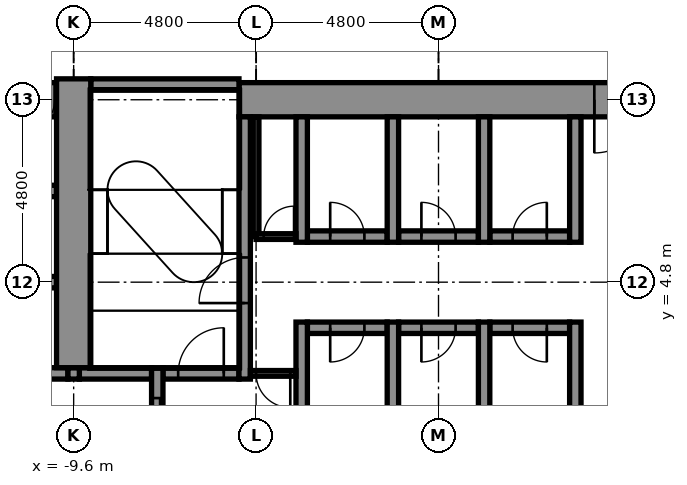
"""IFC4 building model, lengths in metres.
Left out: names, types, materials, properties, quantities, classifications, styles, units other than length and angle.
Written with IfcOpenShell. Run it as: python <this file> out.ifc"""

import sys

from ifc_helpers import new_model, si_unit, direction, frame, frame_2d, origin, place, context, subcontext, project, spatial, rectangle, extrude, element, fill, save


model = new_model("IFC4")
c1 = context("Model", 3, precision=1e-05, world=origin(), true_north=direction((0.0, 1.0)))
c2 = subcontext(c1, "Body", "Model", "MODEL_VIEW")
j1 = project(units=[si_unit("LENGTHUNIT", "METRE"), si_unit("PLANEANGLEUNIT", "RADIAN")], contexts=[c1])
p1 = place(None, origin())
s1 = spatial("IfcSite", under=j1, at=p1, CompositionType="ELEMENT")
p2 = place(p1, origin())
s2 = spatial("IfcBuilding", under=s1, at=p2, CompositionType="ELEMENT")
p3 = place(p2, frame((0.0, 0.0, 77.9)))
s3 = spatial("IfcBuildingStorey", under=s2, at=p3, CompositionType="ELEMENT", Elevation=77.9)
p4 = place(p3, frame((-10.85, 2.4, -0.2), z_axis=(0.0, 0.0, 1.0), x_axis=(1.0, 0.0, 0.0)))
e1 = element("IfcWall", 1, at=p4, inside=s3, PredefinedType="STANDARD", context=c2, shape_type="SweptSolid", body=[
    extrude(rectangle(XDim=1.1, YDim=0.3, at=frame_2d((0.55, 0.0))), origin(), (0.0, 0.0, 1.0), 4.5),
])
p5 = place(p3, frame((-9.45, 2.4, -0.2), z_axis=(0.0, 0.0, 1.0), x_axis=(1.0, 0.0, 0.0)))
e2 = element("IfcWall", 2, at=p5, inside=s3, PredefinedType="STANDARD", context=c2, shape_type="SweptSolid", body=[
    extrude(rectangle(XDim=1.9, YDim=0.3, at=frame_2d((0.95, 0.0))), origin(), (0.0, 0.0, 1.0), 4.5),
])
p6 = place(p3, frame((-7.25, 2.4, -0.2), z_axis=(0.0, 0.0, 1.0), x_axis=(1.0, 0.0, 0.0)))
e3 = element("IfcWall", 3, at=p6, inside=s3, PredefinedType="STANDARD", context=c2, shape_type="SweptSolid", body=[
    extrude(rectangle(XDim=2.0, YDim=0.3, at=frame_2d((1.0, 0.0))), origin(), (0.0, 0.0, 1.0), 4.5),
])
p7 = place(p6, frame((0.4, 0.0, 0.2)))
e4 = element("IfcOpeningElement", 4, at=p7, cuts=e3, PredefinedType="OPENING", context=c2, shape_type="SweptSolid", body=[
    extrude(rectangle(XDim=1.2, YDim=2.1, at=frame_2d((0.6, 1.05))), frame((0.0, 0.16, 0.0), z_axis=(0.0, -1.0, 0.0), x_axis=(1.0, 0.0, 0.0)), (0.0, 0.0, 1.0), 0.32),
])
p8 = place(p3, frame((-3.45, 3.6, -0.2), z_axis=(0.0, 0.0, 1.0), x_axis=(1.0, 0.0, 0.0)))
e5 = element("IfcWall", 5, at=p8, inside=s3, PredefinedType="STANDARD", context=c2, shape_type="SweptSolid", body=[
    extrude(rectangle(XDim=2.1, YDim=0.3, at=frame_2d((1.05, 0.0))), origin(), (0.0, 0.0, 1.0), 4.5),
])
p9 = place(p8, frame((0.6, 0.0, 0.2)))
e6 = element("IfcOpeningElement", 6, at=p9, cuts=e5, PredefinedType="OPENING", context=c2, shape_type="SweptSolid", body=[
    extrude(rectangle(XDim=0.9, YDim=2.1, at=frame_2d((0.45, 1.05))), frame((0.0, 0.16, 0.0), z_axis=(0.0, -1.0, 0.0), x_axis=(1.0, 0.0, 0.0)), (0.0, 0.0, 1.0), 0.32),
])
p10 = place(p3, frame((-1.05, 3.6, -0.2), z_axis=(0.0, 0.0, 1.0), x_axis=(1.0, 0.0, 0.0)))
e7 = element("IfcWall", 7, at=p10, inside=s3, PredefinedType="STANDARD", context=c2, shape_type="SweptSolid", body=[
    extrude(rectangle(XDim=2.1, YDim=0.3, at=frame_2d((1.05, 0.0))), origin(), (0.0, 0.0, 1.0), 4.5),
])
p11 = place(p10, frame((0.6, 0.0, 0.2)))
e8 = element("IfcOpeningElement", 8, at=p11, cuts=e7, PredefinedType="OPENING", context=c2, shape_type="SweptSolid", body=[
    extrude(rectangle(XDim=0.9, YDim=2.1, at=frame_2d((0.45, 1.05))), frame((0.0, 0.16, 0.0), z_axis=(0.0, -1.0, 0.0), x_axis=(1.0, 0.0, 0.0)), (0.0, 0.0, 1.0), 0.32),
])
p12 = place(p3, frame((1.35, 3.6, -0.2), z_axis=(0.0, 0.0, 1.0), x_axis=(1.0, 0.0, 0.0)))
e9 = element("IfcWall", 9, at=p12, inside=s3, PredefinedType="STANDARD", context=c2, shape_type="SweptSolid", body=[
    extrude(rectangle(XDim=2.1, YDim=0.3, at=frame_2d((1.05, 0.0))), origin(), (0.0, 0.0, 1.0), 4.5),
])
p13 = place(p12, frame((0.6, 0.0, 0.2)))
e10 = element("IfcOpeningElement", 10, at=p13, cuts=e9, PredefinedType="OPENING", context=c2, shape_type="SweptSolid", body=[
    extrude(rectangle(XDim=0.9, YDim=2.1, at=frame_2d((0.45, 1.05))), frame((0.0, 0.16, 0.0), z_axis=(0.0, -1.0, 0.0), x_axis=(1.0, 0.0, 0.0)), (0.0, 0.0, 1.0), 0.32),
])
p14 = place(p3, frame((-13.95, 4.8, -0.2), z_axis=(0.0, 0.0, 1.0), x_axis=(1.0, 0.0, 0.0)))
e11 = element("IfcWall", 11, at=p14, inside=s3, PredefinedType="STANDARD", context=c2, shape_type="SweptSolid", body=[
    extrude(rectangle(XDim=3.9, YDim=0.3, at=frame_2d((1.95, 0.0))), origin(), (0.0, 0.0, 1.0), 4.5),
])
p15 = place(p3, frame((-3.45, 6.0, -0.2), z_axis=(0.0, 0.0, 1.0), x_axis=(1.0, 0.0, 0.0)))
e12 = element("IfcWall", 12, at=p15, inside=s3, PredefinedType="STANDARD", context=c2, shape_type="SweptSolid", body=[
    extrude(rectangle(XDim=2.1, YDim=0.3, at=frame_2d((1.05, 0.0))), origin(), (0.0, 0.0, 1.0), 4.5),
])
p16 = place(p15, frame((0.6, 0.0, 0.2)))
e13 = element("IfcOpeningElement", 13, at=p16, cuts=e12, PredefinedType="OPENING", context=c2, shape_type="SweptSolid", body=[
    extrude(rectangle(XDim=0.9, YDim=2.1, at=frame_2d((0.45, 1.05))), frame((0.0, 0.16, 0.0), z_axis=(0.0, -1.0, 0.0), x_axis=(1.0, 0.0, 0.0)), (0.0, 0.0, 1.0), 0.32),
])
p17 = place(p3, frame((-1.05, 6.0, -0.2), z_axis=(0.0, 0.0, 1.0), x_axis=(1.0, 0.0, 0.0)))
e14 = element("IfcWall", 14, at=p17, inside=s3, PredefinedType="STANDARD", context=c2, shape_type="SweptSolid", body=[
    extrude(rectangle(XDim=2.1, YDim=0.3, at=frame_2d((1.05, 0.0))), origin(), (0.0, 0.0, 1.0), 4.5),
])
p18 = place(p17, frame((0.6, 0.0, 0.2)))
e15 = element("IfcOpeningElement", 15, at=p18, cuts=e14, PredefinedType="OPENING", context=c2, shape_type="SweptSolid", body=[
    extrude(rectangle(XDim=0.9, YDim=2.1, at=frame_2d((0.45, 1.05))), frame((0.0, 0.16, 0.0), z_axis=(0.0, -1.0, 0.0), x_axis=(1.0, 0.0, 0.0)), (0.0, 0.0, 1.0), 0.32),
])
p19 = place(p3, frame((1.35, 6.0, -0.2), z_axis=(0.0, 0.0, 1.0), x_axis=(1.0, 0.0, 0.0)))
e16 = element("IfcWall", 16, at=p19, inside=s3, PredefinedType="STANDARD", context=c2, shape_type="SweptSolid", body=[
    extrude(rectangle(XDim=2.1, YDim=0.3, at=frame_2d((1.05, 0.0))), origin(), (0.0, 0.0, 1.0), 4.5),
])
p20 = place(p19, frame((0.6, 0.0, 0.2)))
e17 = element("IfcOpeningElement", 17, at=p20, cuts=e16, PredefinedType="OPENING", context=c2, shape_type="SweptSolid", body=[
    extrude(rectangle(XDim=0.9, YDim=2.1, at=frame_2d((0.45, 1.05))), frame((0.0, 0.16, 0.0), z_axis=(0.0, -1.0, 0.0), x_axis=(1.0, 0.0, 0.0)), (0.0, 0.0, 1.0), 0.32),
])
p21 = place(p3, frame((-13.95, 7.2, -0.2), z_axis=(0.0, 0.0, 1.0), x_axis=(1.0, 0.0, 0.0)))
e18 = element("IfcWall", 18, at=p21, inside=s3, PredefinedType="STANDARD", context=c2, shape_type="SweptSolid", body=[
    extrude(rectangle(XDim=3.9, YDim=0.3, at=frame_2d((1.95, 0.0))), origin(), (0.0, 0.0, 1.0), 4.5),
])
p22 = place(p3, frame((-13.95, 9.6, -0.2), z_axis=(0.0, 0.0, 1.0), x_axis=(1.0, 0.0, 0.0)))
e19 = element("IfcWall", 19, at=p22, inside=s3, PredefinedType="SHEAR", context=c2, shape_type="SweptSolid", body=[
    extrude(rectangle(XDim=3.9, YDim=0.9, at=frame_2d((1.95, 0.0))), origin(), (0.0, 0.0, 1.0), 4.5),
])
p23 = place(p22, frame((0.7, 0.0, 0.2)))
e20 = element("IfcOpeningElement", 20, at=p23, cuts=e19, PredefinedType="OPENING", context=c2, shape_type="SweptSolid", body=[
    extrude(rectangle(XDim=0.9, YDim=2.1, at=frame_2d((0.45, 1.05))), frame((0.0, 0.46, 0.0), z_axis=(0.0, -1.0, 0.0), x_axis=(1.0, 0.0, 0.0)), (0.0, 0.0, 1.0), 0.92),
])
p24 = place(p22, frame((2.95, 0.0, 0.2)))
e21 = element("IfcOpeningElement", 21, at=p24, cuts=e19, PredefinedType="OPENING", context=c2, shape_type="SweptSolid", body=[
    extrude(rectangle(XDim=0.9, YDim=2.1, at=frame_2d((0.45, 1.05))), frame((0.0, 0.46, 0.0), z_axis=(0.0, -1.0, 0.0), x_axis=(1.0, 0.0, 0.0)), (0.0, 0.0, 1.0), 0.92),
])
p25 = place(p3, frame((-5.25, 9.6, -0.2), z_axis=(0.0, 0.0, 1.0), x_axis=(1.0, 0.0, 0.0)))
e22 = element("IfcWall", 22, at=p25, inside=s3, PredefinedType="SHEAR", context=c2, shape_type="SweptSolid", body=[
    extrude(rectangle(XDim=14.4, YDim=0.9, at=frame_2d((7.2, 0.0))), origin(), (0.0, 0.0, 1.0), 4.5),
])
p26 = place(p25, frame((9.35, 0.0, 0.2)))
e23 = element("IfcOpeningElement", 23, at=p26, cuts=e22, PredefinedType="OPENING", context=c2, shape_type="SweptSolid", body=[
    extrude(rectangle(XDim=1.4, YDim=2.1, at=frame_2d((0.7, 1.05))), frame((0.0, 0.46, 0.0), z_axis=(0.0, -1.0, 0.0), x_axis=(1.0, 0.0, 0.0)), (0.0, 0.0, 1.0), 0.92),
])
p27 = place(p3, frame((-9.15, 10.0, -0.2), z_axis=(0.0, 0.0, 1.0), x_axis=(1.0, 0.0, 0.0)))
e24 = element("IfcWall", 24, at=p27, inside=s3, PredefinedType="STANDARD", context=c2, shape_type="SweptSolid", body=[
    extrude(rectangle(XDim=3.9, YDim=0.3, at=frame_2d((1.95, 0.0))), origin(), (0.0, 0.0, 1.0), 4.5),
])
p28 = place(p3, frame((-9.6, 2.25, -0.2), z_axis=(0.0, 0.0, 1.0), x_axis=(0.0, 1.0, 0.0)))
e25 = element("IfcWall", 25, at=p28, inside=s3, PredefinedType="STANDARD", context=c2, shape_type="SweptSolid", body=[
    extrude(rectangle(XDim=0.3, YDim=0.3, at=frame_2d((0.15, 0.0))), origin(), (0.0, 0.0, 1.0), 4.5),
])
p29 = place(p3, frame((-9.6, 2.55, -0.2), z_axis=(0.0, 0.0, 1.0), x_axis=(0.0, 1.0, 0.0)))
e26 = element("IfcWall", 26, at=p29, inside=s3, PredefinedType="SHEAR", context=c2, shape_type="SweptSolid", body=[
    extrude(rectangle(XDim=7.6, YDim=0.9, at=frame_2d((3.8, 0.0))), origin(), (0.0, 0.0, 1.0), 4.5),
])
p30 = place(p3, frame((-7.4, -2.55, -0.2), z_axis=(0.0, 0.0, 1.0), x_axis=(0.0, 1.0, 0.0)))
e27 = element("IfcWall", 27, at=p30, inside=s3, PredefinedType="STANDARD", context=c2, shape_type="SweptSolid", body=[
    extrude(rectangle(XDim=5.1, YDim=0.3, at=frame_2d((2.55, 0.0))), origin(), (0.0, 0.0, 1.0), 4.5),
])
p31 = place(p30, frame((0.8, 0.0, 0.2)))
e28 = element("IfcOpeningElement", 28, at=p31, cuts=e27, PredefinedType="OPENING", context=c2, shape_type="SweptSolid", body=[
    extrude(rectangle(XDim=1.1, YDim=2.1, at=frame_2d((0.55, 1.05))), frame((0.0, 0.16, 0.0), z_axis=(0.0, -1.0, 0.0), x_axis=(1.0, 0.0, 0.0)), (0.0, 0.0, 1.0), 0.32),
])
p32 = place(p30, frame((3.2, 0.0, 0.2)))
e29 = element("IfcOpeningElement", 29, at=p32, cuts=e27, PredefinedType="OPENING", context=c2, shape_type="SweptSolid", body=[
    extrude(rectangle(XDim=1.1, YDim=2.1, at=frame_2d((0.55, 1.05))), frame((0.0, 0.16, 0.0), z_axis=(0.0, -1.0, 0.0), x_axis=(1.0, 0.0, 0.0)), (0.0, 0.0, 1.0), 0.32),
])
p33 = place(p3, frame((-5.1, 2.25, -0.2), z_axis=(0.0, 0.0, 1.0), x_axis=(0.0, 1.0, 0.0)))
e30 = element("IfcWall", 30, at=p33, inside=s3, PredefinedType="STANDARD", context=c2, shape_type="SweptSolid", body=[
    extrude(rectangle(XDim=6.9, YDim=0.3, at=frame_2d((3.45, 0.0))), origin(), (0.0, 0.0, 1.0), 4.5),
])
p34 = place(p33, frame((2.0, 0.0, 0.2)))
e31 = element("IfcOpeningElement", 31, at=p34, cuts=e30, PredefinedType="OPENING", context=c2, shape_type="SweptSolid", body=[
    extrude(rectangle(XDim=1.2, YDim=2.1, at=frame_2d((0.6, 1.05))), frame((0.0, 0.16, 0.0), z_axis=(0.0, -1.0, 0.0), x_axis=(1.0, 0.0, 0.0)), (0.0, 0.0, 1.0), 0.32),
])
p35 = place(p3, frame((-3.6, -3.75, -0.2), z_axis=(0.0, 0.0, 1.0), x_axis=(0.0, 1.0, 0.0)))
e32 = element("IfcWall", 32, at=p35, inside=s3, PredefinedType="STANDARD", context=c2, shape_type="SweptSolid", body=[
    extrude(rectangle(XDim=7.5, YDim=0.3, at=frame_2d((3.75, 0.0))), origin(), (0.0, 0.0, 1.0), 4.5),
])
p36 = place(p3, frame((-3.6, 5.85, -0.2), z_axis=(0.0, 0.0, 1.0), x_axis=(0.0, 1.0, 0.0)))
e33 = element("IfcWall", 33, at=p36, inside=s3, PredefinedType="STANDARD", context=c2, shape_type="SweptSolid", body=[
    extrude(rectangle(XDim=3.3, YDim=0.3, at=frame_2d((1.65, 0.0))), origin(), (0.0, 0.0, 1.0), 4.5),
])
p37 = place(p3, frame((-1.2, -3.75, -0.2), z_axis=(0.0, 0.0, 1.0), x_axis=(0.0, 1.0, 0.0)))
e34 = element("IfcWall", 34, at=p37, inside=s3, PredefinedType="STANDARD", context=c2, shape_type="SweptSolid", body=[
    extrude(rectangle(XDim=7.5, YDim=0.3, at=frame_2d((3.75, 0.0))), origin(), (0.0, 0.0, 1.0), 4.5),
])
p38 = place(p3, frame((-1.2, 5.85, -0.2), z_axis=(0.0, 0.0, 1.0), x_axis=(0.0, 1.0, 0.0)))
e35 = element("IfcWall", 35, at=p38, inside=s3, PredefinedType="STANDARD", context=c2, shape_type="SweptSolid", body=[
    extrude(rectangle(XDim=3.3, YDim=0.3, at=frame_2d((1.65, 0.0))), origin(), (0.0, 0.0, 1.0), 4.5),
])
p39 = place(p3, frame((1.2, -3.75, -0.2), z_axis=(0.0, 0.0, 1.0), x_axis=(0.0, 1.0, 0.0)))
e36 = element("IfcWall", 36, at=p39, inside=s3, PredefinedType="STANDARD", context=c2, shape_type="SweptSolid", body=[
    extrude(rectangle(XDim=7.5, YDim=0.3, at=frame_2d((3.75, 0.0))), origin(), (0.0, 0.0, 1.0), 4.5),
])
p40 = place(p3, frame((1.2, 5.85, -0.2), z_axis=(0.0, 0.0, 1.0), x_axis=(0.0, 1.0, 0.0)))
e37 = element("IfcWall", 37, at=p40, inside=s3, PredefinedType="STANDARD", context=c2, shape_type="SweptSolid", body=[
    extrude(rectangle(XDim=3.3, YDim=0.3, at=frame_2d((1.65, 0.0))), origin(), (0.0, 0.0, 1.0), 4.5),
])
p41 = place(p3, frame((3.6, -3.75, -0.2), z_axis=(0.0, 0.0, 1.0), x_axis=(0.0, 1.0, 0.0)))
e38 = element("IfcWall", 38, at=p41, inside=s3, PredefinedType="STANDARD", context=c2, shape_type="SweptSolid", body=[
    extrude(rectangle(XDim=7.5, YDim=0.3, at=frame_2d((3.75, 0.0))), origin(), (0.0, 0.0, 1.0), 4.5),
])
p42 = place(p3, frame((3.6, 5.85, -0.2), z_axis=(0.0, 0.0, 1.0), x_axis=(0.0, 1.0, 0.0)))
e39 = element("IfcWall", 39, at=p42, inside=s3, PredefinedType="STANDARD", context=c2, shape_type="SweptSolid", body=[
    extrude(rectangle(XDim=3.3, YDim=0.3, at=frame_2d((1.65, 0.0))), origin(), (0.0, 0.0, 1.0), 4.5),
])
p43 = place(p3, frame((-4.8, 6.0, 0.0), z_axis=(0.0, 0.0, 1.0), x_axis=(0.0, 1.0, 0.0)))
e40 = element("IfcWall", 40, at=p43, inside=s3, PredefinedType="PARTITIONING", context=c2, shape_type="SweptSolid", body=[
    extrude(rectangle(XDim=3.15, YDim=0.15, at=frame_2d((1.575, 0.0))), origin(), (0.0, 0.0, 1.0), 4.3),
])
p44 = place(p3, frame((-4.8, 6.0, 0.0), z_axis=(0.0, 0.0, 1.0), x_axis=(1.0, 0.0, 0.0)))
e41 = element("IfcWall", 41, at=p44, inside=s3, PredefinedType="PARTITIONING", context=c2, shape_type="SweptSolid", body=[
    extrude(rectangle(XDim=1.05, YDim=0.15, at=frame_2d((0.525, 0.0))), origin(), (0.0, 0.0, 1.0), 4.3),
])
p45 = place(p44, frame((0.2, 0.0, 0.0)))
e42 = element("IfcOpeningElement", 42, at=p45, cuts=e41, PredefinedType="OPENING", context=c2, shape_type="SweptSolid", body=[
    extrude(rectangle(XDim=0.8, YDim=2.1, at=frame_2d((0.4, 1.05))), frame((0.0, 0.085, 0.0), z_axis=(0.0, -1.0, 0.0), x_axis=(1.0, 0.0, 0.0)), (0.0, 0.0, 1.0), 0.17),
])
p46 = place(p3, frame((-4.95, 2.4, 0.0), z_axis=(0.0, 0.0, 1.0), x_axis=(1.0, 0.0, 0.0)))
e43 = element("IfcWall", 43, at=p46, inside=s3, PredefinedType="PARTITIONING", context=c2, shape_type="SweptSolid", body=[
    extrude(rectangle(XDim=1.2, YDim=0.15, at=frame_2d((0.6, 0.0))), origin(), (0.0, 0.0, 1.0), 4.3),
])
p47 = place(p46, frame((0.15, 0.0, 0.0)))
e44 = element("IfcOpeningElement", 44, at=p47, cuts=e43, PredefinedType="OPENING", context=c2, shape_type="SweptSolid", body=[
    extrude(rectangle(XDim=0.9, YDim=2.1, at=frame_2d((0.45, 1.05))), frame((0.0, 0.085, 0.0), z_axis=(0.0, -1.0, 0.0), x_axis=(1.0, 0.0, 0.0)), (0.0, 0.0, 1.0), 0.17),
])
p48 = place(p45, origin())
e45 = element("IfcDoor", 45, at=p48, inside=s3, OperationType="SINGLE_SWING_RIGHT", PredefinedType="DOOR", context=c2, shape_type="SweptSolid", body=[
    extrude(rectangle(XDim=0.8, YDim=2.1, at=frame_2d((0.4, 1.05))), frame((0.0, 0.025, 0.0), z_axis=(0.0, -1.0, 0.0), x_axis=(1.0, 0.0, 0.0)), (0.0, 0.0, 1.0), 0.05),
])
fill(e42, e45)
p49 = place(p32, origin())
e46 = element("IfcDoor", 46, at=p49, inside=s3, OperationType="DOUBLE_DOOR_SLIDING", PredefinedType="DOOR", context=c2, shape_type="SweptSolid", body=[
    extrude(rectangle(XDim=1.1, YDim=2.1, at=frame_2d((0.55, 1.05))), frame((0.0, 0.025, 0.0), z_axis=(0.0, -1.0, 0.0), x_axis=(1.0, 0.0, 0.0)), (0.0, 0.0, 1.0), 0.05),
])
fill(e29, e46)
p50 = place(p34, origin())
e47 = element("IfcDoor", 47, at=p50, inside=s3, OperationType="SINGLE_SWING_LEFT", PredefinedType="DOOR", context=c2, shape_type="SweptSolid", body=[
    extrude(rectangle(XDim=1.2, YDim=2.1, at=frame_2d((0.6, 1.05))), frame((0.0, 0.025, 0.0), z_axis=(0.0, -1.0, 0.0), x_axis=(1.0, 0.0, 0.0)), (0.0, 0.0, 1.0), 0.05),
])
fill(e31, e47)
p51 = place(p16, origin())
e48 = element("IfcDoor", 48, at=p51, inside=s3, OperationType="SINGLE_SWING_LEFT", PredefinedType="DOOR", context=c2, shape_type="SweptSolid", body=[
    extrude(rectangle(XDim=0.9, YDim=2.1, at=frame_2d((0.45, 1.05))), frame((0.0, 0.025, 0.0), z_axis=(0.0, -1.0, 0.0), x_axis=(1.0, 0.0, 0.0)), (0.0, 0.0, 1.0), 0.05),
])
fill(e13, e48)
p52 = place(p18, origin())
e49 = element("IfcDoor", 49, at=p52, inside=s3, OperationType="SINGLE_SWING_LEFT", PredefinedType="DOOR", context=c2, shape_type="SweptSolid", body=[
    extrude(rectangle(XDim=0.9, YDim=2.1, at=frame_2d((0.45, 1.05))), frame((0.0, 0.025, 0.0), z_axis=(0.0, -1.0, 0.0), x_axis=(1.0, 0.0, 0.0)), (0.0, 0.0, 1.0), 0.05),
])
fill(e15, e49)
p53 = place(p20, origin())
e50 = element("IfcDoor", 50, at=p53, inside=s3, OperationType="SINGLE_SWING_RIGHT", PredefinedType="DOOR", context=c2, shape_type="SweptSolid", body=[
    extrude(rectangle(XDim=0.9, YDim=2.1, at=frame_2d((0.45, 1.05))), frame((0.0, 0.025, 0.0), z_axis=(0.0, -1.0, 0.0), x_axis=(1.0, 0.0, 0.0)), (0.0, 0.0, 1.0), 0.05),
])
fill(e17, e50)
p54 = place(p9, frame((0.9, 0.0, 0.0), z_axis=(0.0, 0.0, 1.0), x_axis=(-1.0, 0.0, 0.0)))
e51 = element("IfcDoor", 51, at=p54, inside=s3, OperationType="SINGLE_SWING_LEFT", PredefinedType="DOOR", context=c2, shape_type="SweptSolid", body=[
    extrude(rectangle(XDim=0.9, YDim=2.1, at=frame_2d((0.45, 1.05))), frame((0.0, 0.025, 0.0), z_axis=(0.0, -1.0, 0.0), x_axis=(1.0, 0.0, 0.0)), (0.0, 0.0, 1.0), 0.05),
])
fill(e6, e51)
p55 = place(p11, frame((0.9, 0.0, 0.0), z_axis=(0.0, 0.0, 1.0), x_axis=(-1.0, 0.0, 0.0)))
e52 = element("IfcDoor", 52, at=p55, inside=s3, OperationType="SINGLE_SWING_LEFT", PredefinedType="DOOR", context=c2, shape_type="SweptSolid", body=[
    extrude(rectangle(XDim=0.9, YDim=2.1, at=frame_2d((0.45, 1.05))), frame((0.0, 0.025, 0.0), z_axis=(0.0, -1.0, 0.0), x_axis=(1.0, 0.0, 0.0)), (0.0, 0.0, 1.0), 0.05),
])
fill(e8, e52)
p56 = place(p13, frame((0.9, 0.0, 0.0), z_axis=(0.0, 0.0, 1.0), x_axis=(-1.0, 0.0, 0.0)))
e53 = element("IfcDoor", 53, at=p56, inside=s3, OperationType="SINGLE_SWING_RIGHT", PredefinedType="DOOR", context=c2, shape_type="SweptSolid", body=[
    extrude(rectangle(XDim=0.9, YDim=2.1, at=frame_2d((0.45, 1.05))), frame((0.0, 0.025, 0.0), z_axis=(0.0, -1.0, 0.0), x_axis=(1.0, 0.0, 0.0)), (0.0, 0.0, 1.0), 0.05),
])
fill(e10, e53)
p57 = place(p24, frame((0.9, 0.0, 0.0), z_axis=(0.0, 0.0, 1.0), x_axis=(-1.0, 0.0, 0.0)))
e54 = element("IfcDoor", 54, at=p57, inside=s3, OperationType="SINGLE_SWING_LEFT", PredefinedType="DOOR", context=c2, shape_type="SweptSolid", body=[
    extrude(rectangle(XDim=0.9, YDim=2.1, at=frame_2d((0.45, 1.05))), frame((0.0, 0.025, 0.0), z_axis=(0.0, -1.0, 0.0), x_axis=(1.0, 0.0, 0.0)), (0.0, 0.0, 1.0), 0.05),
])
fill(e21, e54)
p58 = place(p26, frame((1.4, 0.0, 0.0), z_axis=(0.0, 0.0, 1.0), x_axis=(-1.0, 0.0, 0.0)))
e55 = element("IfcDoor", 55, at=p58, inside=s3, OperationType="SINGLE_SWING_LEFT", PredefinedType="DOOR", context=c2, shape_type="SweptSolid", body=[
    extrude(rectangle(XDim=1.4, YDim=2.1, at=frame_2d((0.7, 1.05))), frame((0.0, 0.025, 0.0), z_axis=(0.0, -1.0, 0.0), x_axis=(1.0, 0.0, 0.0)), (0.0, 0.0, 1.0), 0.05),
])
fill(e23, e55)
p59 = place(p47, frame((0.9, 0.0, 0.0), z_axis=(0.0, 0.0, 1.0), x_axis=(-1.0, 0.0, 0.0)))
e56 = element("IfcDoor", 56, at=p59, inside=s3, OperationType="SINGLE_SWING_RIGHT", PredefinedType="DOOR", context=c2, shape_type="SweptSolid", body=[
    extrude(rectangle(XDim=0.9, YDim=2.1, at=frame_2d((0.45, 1.05))), frame((0.0, 0.025, 0.0), z_axis=(0.0, -1.0, 0.0), x_axis=(1.0, 0.0, 0.0)), (0.0, 0.0, 1.0), 0.05),
])
fill(e44, e56)
p60 = place(p7, origin())
e57 = element("IfcDoor", 57, at=p60, inside=s3, OperationType="SINGLE_SWING_RIGHT", PredefinedType="DOOR", context=c2, shape_type="SweptSolid", body=[
    extrude(rectangle(XDim=1.2, YDim=2.1, at=frame_2d((0.6, 1.05))), frame((0.0, 0.025, 0.0), z_axis=(0.0, -1.0, 0.0), x_axis=(1.0, 0.0, 0.0)), (0.0, 0.0, 1.0), 0.05),
])
fill(e4, e57)
save(model, sys.argv[1])
